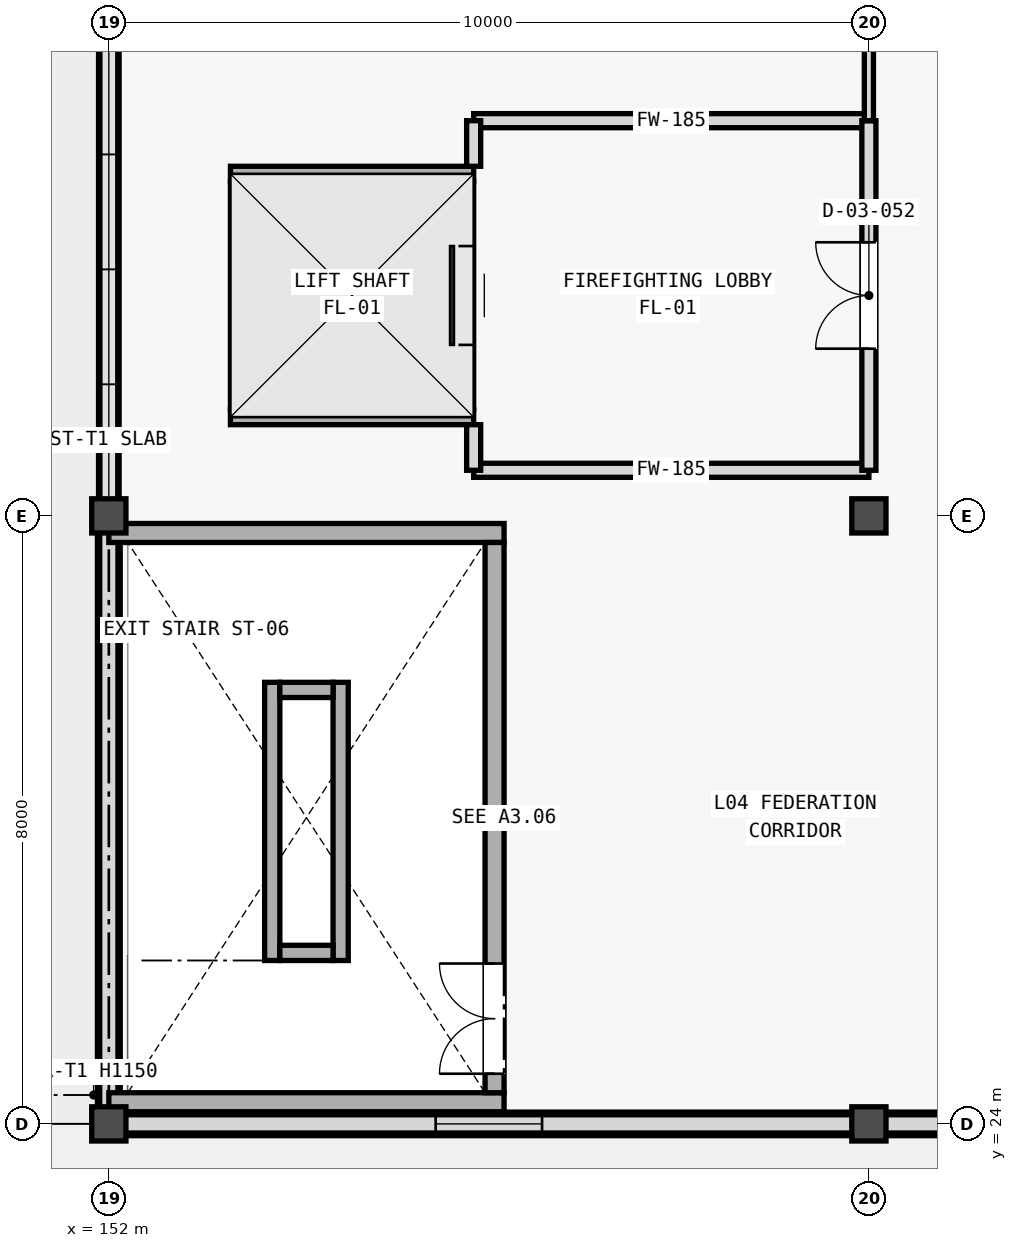
"""IFC4 building model, lengths in metres.
Left out: names, types, materials, properties, quantities, classifications, styles, units other than length and angle.
Written with IfcOpenShell. Run it as: python <this file> out.ifc"""

import sys

from ifc_helpers import new_model, si_unit, direction, frame, frame_2d, origin, origin_2d, place, context, subcontext, project, spatial, rectangle, extrude, element, fill, save


model = new_model("IFC4")
c1 = context("Model", 3, precision=1e-05, world=origin(), true_north=direction((0.0, 1.0)))
c2 = subcontext(c1, "Body", "Model", "MODEL_VIEW")
j1 = project(units=[si_unit("LENGTHUNIT", "METRE"), si_unit("PLANEANGLEUNIT", "RADIAN")], contexts=[c1])
p1 = place(None, origin())
s1 = spatial("IfcSite", under=j1, at=p1, CompositionType="ELEMENT")
p2 = place(p1, origin())
s2 = spatial("IfcBuilding", under=s1, at=p2, CompositionType="ELEMENT")
p3 = place(p2, frame((0.0, 0.0, 18.6)))
s3 = spatial("IfcBuildingStorey", under=s2, at=p3, CompositionType="ELEMENT", Elevation=18.6)
for number, where, z_axis, x_axis in (
    (1, (152.0, 24.0, 0.0), (0.0, 0.0, 1.0), (1.0, 0.0, 0.0)),
    (2, (162.0, 24.0, 0.0), (0.0, 0.0, 1.0), (1.0, 0.0, 0.0)),
    (3, (152.0, 32.0, 0.0), (0.0, 0.0, 1.0), (1.0, 0.0, 0.0)),
    (4, (162.0, 32.0, 0.0), (0.0, 0.0, 1.0), (1.0, 0.0, 0.0)),
):
    element("IfcColumn", number, at=place(p3, frame(where, z_axis=z_axis, x_axis=x_axis)), inside=s3, PredefinedType="COLUMN", context=c2, shape_type="SweptSolid", body=[
        extrude(rectangle(XDim=0.45, YDim=0.45, at=origin_2d()), origin(), (0.0, 0.0, 1.0), 3.985),
    ])
p4 = place(p3, frame((152.0, 24.221, 0.0), z_axis=(0.0, 0.0, 1.0), x_axis=(0.0, 1.0, 0.0)))
e5 = element("IfcWall", 5, at=p4, inside=s3, PredefinedType="SHEAR", context=c2, shape_type="SweptSolid", body=[
    extrude(rectangle(XDim=7.558, YDim=0.3, at=frame_2d((3.779, 0.0))), origin(), (0.0, 0.0, 1.0), 3.985),
])
p5 = place(p3, frame((152.0, 32.221, 0.0), z_axis=(0.0, 0.0, 1.0), x_axis=(0.0, 1.0, 0.0)))
e6 = element("IfcWall", 6, at=p5, inside=s3, PredefinedType="STANDARD", context=c2, shape_type="SweptSolid", body=[
    extrude(rectangle(XDim=7.558, YDim=0.27, at=frame_2d((3.779, 0.0))), origin(), (0.0, 0.0, 1.0), 0.8),
])
p6 = place(p3, frame((152.221, 24.0, 0.0), z_axis=(0.0, 0.0, 1.0), x_axis=(1.0, 0.0, 0.0)))
e7 = element("IfcWall", 7, at=p6, inside=s3, PredefinedType="STANDARD", context=c2, shape_type="SweptSolid", body=[
    extrude(rectangle(XDim=9.558, YDim=0.31, at=frame_2d((4.779, 0.0))), origin(), (0.0, 0.0, 1.0), 3.4),
])
p7 = place(p6, frame((4.079, 0.0, 0.95)))
e8 = element("IfcOpeningElement", 8, at=p7, cuts=e7, PredefinedType="OPENING", context=c2, shape_type="SweptSolid", body=[
    extrude(rectangle(XDim=1.4, YDim=1.8, at=frame_2d((0.7, 0.9))), frame((0.0, 0.165, 0.0), z_axis=(0.0, -1.0, 0.0), x_axis=(1.0, 0.0, 0.0)), (0.0, 0.0, 1.0), 0.33),
])
p8 = place(p3, frame((162.221, 24.0, 0.0), z_axis=(0.0, 0.0, 1.0), x_axis=(1.0, 0.0, 0.0)))
e9 = element("IfcWall", 9, at=p8, inside=s3, PredefinedType="STANDARD", context=c2, shape_type="SweptSolid", body=[
    extrude(rectangle(XDim=11.558, YDim=0.31, at=frame_2d((5.779, 0.0))), origin(), (0.0, 0.0, 1.0), 3.4),
])
p9 = place(p8, frame((5.029, 0.0, 0.95)))
e10 = element("IfcOpeningElement", 10, at=p9, cuts=e9, PredefinedType="OPENING", context=c2, shape_type="SweptSolid", body=[
    extrude(rectangle(XDim=1.5, YDim=1.75, at=frame_2d((0.75, 0.875))), frame((0.0, 0.165, 0.0), z_axis=(0.0, -1.0, 0.0), x_axis=(1.0, 0.0, 0.0)), (0.0, 0.0, 1.0), 0.33),
])
p10 = place(p3, frame((152.0, 24.0, 4.2), z_axis=(0.0, 0.0, 1.0), x_axis=(1.0, 0.0, 0.0)))
e11 = element("IfcWall", 11, at=p10, inside=s3, PredefinedType="PARAPET", context=c2, shape_type="SweptSolid", body=[
    extrude(rectangle(XDim=32.0, YDim=0.24, at=frame_2d((16.0, 0.0))), origin(), (0.0, 0.0, 1.0), 1.1),
])
p11 = place(p3, frame((152.0, 24.12, 4.2), z_axis=(0.0, 0.0, 1.0), x_axis=(0.0, 1.0, 0.0)))
e12 = element("IfcWall", 12, at=p11, inside=s3, PredefinedType="PARAPET", context=c2, shape_type="SweptSolid", body=[
    extrude(rectangle(XDim=55.76, YDim=0.24, at=frame_2d((27.88, 0.0))), origin(), (0.0, 0.0, 1.0), 1.1),
])
for number, where, z_axis, x_axis in (
    (13, (152.0, 24.285, 0.0), (0.0, 0.0, 1.0), (1.0, 0.0, 0.0)),
    (14, (152.0, 31.775, 0.0), (0.0, 0.0, 1.0), (1.0, 0.0, 0.0)),
):
    element("IfcWall", number, at=place(p3, frame(where, z_axis=z_axis, x_axis=x_axis)), inside=s3, PredefinedType="SHEAR", context=c2, shape_type="SweptSolid", body=[
        extrude(rectangle(XDim=5.2, YDim=0.25, at=frame_2d((2.6, 0.0))), origin(), (0.0, 0.0, 1.0), 3.985),
    ])
p12 = place(p3, frame((157.075, 24.41, 0.0), z_axis=(0.0, 0.0, 1.0), x_axis=(0.0, 1.0, 0.0)))
e15 = element("IfcWall", 15, at=p12, inside=s3, PredefinedType="SHEAR", context=c2, shape_type="SweptSolid", body=[
    extrude(rectangle(XDim=7.24, YDim=0.25, at=frame_2d((3.62, 0.0))), origin(), (0.0, 0.0, 1.0), 3.985),
])
p13 = place(p12, frame((0.25, 0.0, 0.0)))
e16 = element("IfcOpeningElement", 16, at=p13, cuts=e15, PredefinedType="OPENING", context=c2, shape_type="SweptSolid", body=[
    extrude(rectangle(XDim=1.45, YDim=2.2, at=frame_2d((0.725, 1.1))), frame((0.0, 0.135, 0.0), z_axis=(0.0, -1.0, 0.0), x_axis=(1.0, 0.0, 0.0)), (0.0, 0.0, 1.0), 0.27),
])
for number, where, z_axis, x_axis in (
    (17, (154.15, 26.15, 0.0), (0.0, 0.0, 1.0), (0.0, 1.0, 0.0)),
    (18, (155.05, 26.15, 0.0), (0.0, 0.0, 1.0), (0.0, 1.0, 0.0)),
):
    element("IfcWall", number, at=place(p3, frame(where, z_axis=z_axis, x_axis=x_axis)), inside=s3, PredefinedType="SHEAR", context=c2, shape_type="SweptSolid", body=[
        extrude(rectangle(XDim=3.66, YDim=0.2, at=frame_2d((1.83, 0.0))), origin(), (0.0, 0.0, 1.0), 3.985),
    ])
for number, where, z_axis, x_axis in (
    (19, (154.25, 26.25, 0.0), (0.0, 0.0, 1.0), (1.0, 0.0, 0.0)),
    (20, (154.25, 29.71, 0.0), (0.0, 0.0, 1.0), (1.0, 0.0, 0.0)),
):
    element("IfcWall", number, at=place(p3, frame(where, z_axis=z_axis, x_axis=x_axis)), inside=s3, PredefinedType="SHEAR", context=c2, shape_type="SweptSolid", body=[
        extrude(rectangle(XDim=0.7, YDim=0.2, at=frame_2d((0.35, 0.0))), origin(), (0.0, 0.0, 1.0), 3.985),
    ])
for number, where, z_axis, x_axis in (
    (21, (153.6, 33.3, 0.0), (0.0, 0.0, 1.0), (1.0, 0.0, 0.0)),
    (22, (153.6, 36.5, 0.0), (0.0, 0.0, 1.0), (1.0, 0.0, 0.0)),
):
    element("IfcWall", number, at=place(p3, frame(where, z_axis=z_axis, x_axis=x_axis)), inside=s3, PredefinedType="SHEAR", context=c2, shape_type="SweptSolid", body=[
        extrude(rectangle(XDim=3.2, YDim=0.2, at=frame_2d((1.6, 0.0))), origin(), (0.0, 0.0, 1.0), 3.985),
    ])
p14 = place(p3, frame((153.7, 33.4, 0.0), z_axis=(0.0, 0.0, 1.0), x_axis=(0.0, 1.0, 0.0)))
e23 = element("IfcWall", 23, at=p14, inside=s3, PredefinedType="SHEAR", context=c2, shape_type="SweptSolid", body=[
    extrude(rectangle(XDim=3.0, YDim=0.2, at=frame_2d((1.5, 0.0))), origin(), (0.0, 0.0, 1.0), 3.985),
])
p15 = place(p3, frame((156.7, 33.4, 0.0), z_axis=(0.0, 0.0, 1.0), x_axis=(0.0, 1.0, 0.0)))
e24 = element("IfcWall", 24, at=p15, inside=s3, PredefinedType="SHEAR", context=c2, shape_type="SweptSolid", body=[
    extrude(rectangle(XDim=3.0, YDim=0.2, at=frame_2d((1.5, 0.0))), origin(), (0.0, 0.0, 1.0), 3.985),
])
p16 = place(p15, frame((0.85, 0.0, 0.0)))
e25 = element("IfcOpeningElement", 25, at=p16, cuts=e24, PredefinedType="OPENING", context=c2, shape_type="SweptSolid", body=[
    extrude(rectangle(XDim=1.3, YDim=2.3, at=frame_2d((0.65, 1.15))), frame((0.0, 0.11, 0.0), z_axis=(0.0, -1.0, 0.0), x_axis=(1.0, 0.0, 0.0)), (0.0, 0.0, 1.0), 0.22),
])
for number, where, z_axis, x_axis in (
    (26, (162.0, 32.6, 0.0), (0.0, 0.0, 1.0), (-1.0, 0.0, 0.0)),
    (27, (156.8, 37.2, 0.0), (0.0, 0.0, 1.0), (1.0, 0.0, 0.0)),
):
    element("IfcWall", number, at=place(p3, frame(where, z_axis=z_axis, x_axis=x_axis)), inside=s3, PredefinedType="STANDARD", context=c2, shape_type="SweptSolid", body=[
        extrude(rectangle(XDim=5.2, YDim=0.185, at=frame_2d((2.6, 0.0))), origin(), (0.0, 0.0, 1.0), 3.365),
    ])
p17 = place(p3, frame((162.0, 32.6, 0.0), z_axis=(0.0, 0.0, 1.0), x_axis=(0.0, 1.0, 0.0)))
e28 = element("IfcWall", 28, at=p17, inside=s3, PredefinedType="STANDARD", context=c2, shape_type="SweptSolid", body=[
    extrude(rectangle(XDim=4.6, YDim=0.185, at=frame_2d((2.3, 0.0))), origin(), (0.0, 0.0, 1.0), 3.365),
])
p18 = place(p17, frame((1.6, 0.0, 0.0)))
e29 = element("IfcOpeningElement", 29, at=p18, cuts=e28, PredefinedType="OPENING", context=c2, shape_type="SweptSolid", body=[
    extrude(rectangle(XDim=1.4, YDim=2.2, at=frame_2d((0.7, 1.1))), frame((0.0, 0.103, 0.0), z_axis=(0.0, -1.0, 0.0), x_axis=(1.0, 0.0, 0.0)), (0.0, 0.0, 1.0), 0.205),
])
for number, where, z_axis, x_axis in (
    (30, (156.8, 32.6, 0.0), (0.0, 0.0, 1.0), (0.0, 1.0, 0.0)),
    (31, (156.8, 36.6, 0.0), (0.0, 0.0, 1.0), (0.0, 1.0, 0.0)),
):
    element("IfcWall", number, at=place(p3, frame(where, z_axis=z_axis, x_axis=x_axis)), inside=s3, PredefinedType="STANDARD", context=c2, shape_type="SweptSolid", body=[
        extrude(rectangle(XDim=0.6, YDim=0.185, at=frame_2d((0.3, 0.0))), origin(), (0.0, 0.0, 1.0), 3.365),
    ])
p19 = place(p3, frame((162.0, 37.2, 0.0), z_axis=(0.0, 0.0, 1.0), x_axis=(0.0, 1.0, 0.0)))
e32 = element("IfcWall", 32, at=p19, inside=s3, PredefinedType="PARTITIONING", context=c2, shape_type="SweptSolid", body=[
    extrude(rectangle(XDim=2.573, YDim=0.12, at=frame_2d((1.287, 0.0))), origin(), (0.0, 0.0, 1.0), 3.365),
])
p20 = place(p7, origin())
e33 = element("IfcWindow", 33, at=p20, inside=s3, PartitioningType="SINGLE_PANEL", PredefinedType="WINDOW", context=c2, shape_type="SweptSolid", body=[
    extrude(rectangle(XDim=1.4, YDim=1.8, at=frame_2d((0.7, 0.9))), frame((0.0, 0.03, 0.0), z_axis=(0.0, -1.0, 0.0), x_axis=(1.0, 0.0, 0.0)), (0.0, 0.0, 1.0), 0.06),
])
fill(e8, e33)
p21 = place(p13, origin())
e34 = element("IfcDoor", 34, at=p21, inside=s3, OperationType="DOUBLE_DOOR_SINGLE_SWING", PredefinedType="DOOR", context=c2, shape_type="SweptSolid", body=[
    extrude(rectangle(XDim=1.45, YDim=2.2, at=frame_2d((0.725, 1.1))), frame((0.0, 0.025, 0.0), z_axis=(0.0, -1.0, 0.0), x_axis=(1.0, 0.0, 0.0)), (0.0, 0.0, 1.0), 0.05),
])
fill(e16, e34)
p22 = place(p16, origin())
e35 = element("IfcDoor", 35, at=p22, inside=s3, OperationType="SLIDING_TO_RIGHT", PredefinedType="DOOR", context=c2, shape_type="SweptSolid", body=[
    extrude(rectangle(XDim=1.3, YDim=2.3, at=frame_2d((0.65, 1.15))), frame((0.0, 0.025, 0.0), z_axis=(0.0, -1.0, 0.0), x_axis=(1.0, 0.0, 0.0)), (0.0, 0.0, 1.0), 0.05),
])
fill(e25, e35)
p23 = place(p18, origin())
e36 = element("IfcDoor", 36, at=p23, inside=s3, OperationType="DOUBLE_DOOR_SINGLE_SWING", PredefinedType="DOOR", context=c2, shape_type="SweptSolid", body=[
    extrude(rectangle(XDim=1.4, YDim=2.2, at=frame_2d((0.7, 1.1))), frame((0.0, 0.025, 0.0), z_axis=(0.0, -1.0, 0.0), x_axis=(1.0, 0.0, 0.0)), (0.0, 0.0, 1.0), 0.05),
])
fill(e29, e36)
save(model, sys.argv[1])
